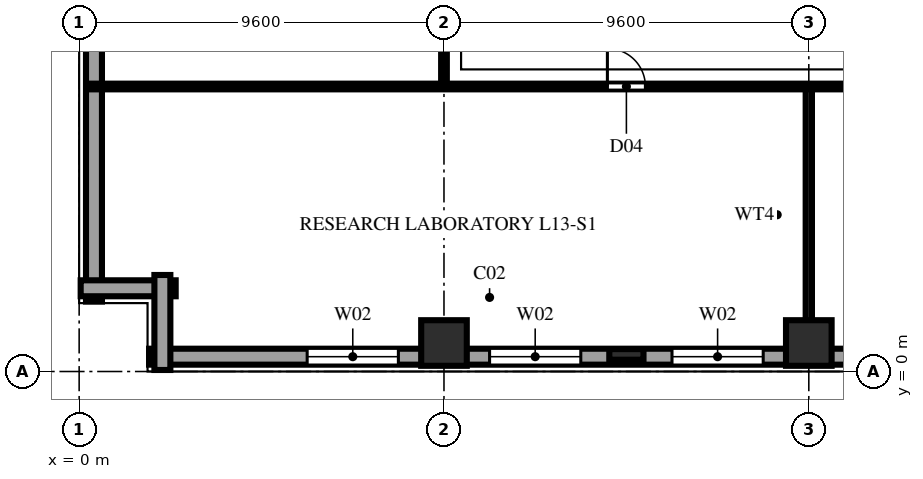
"""IFC4 building model, lengths in metres.
Left out: names, types, materials, properties, quantities, classifications, styles, units other than length and angle.
Written with IfcOpenShell. Run it as: python <this file> out.ifc"""

import sys

from ifc_helpers import new_model, si_unit, direction, frame, frame_2d, origin, origin_2d, place, context, subcontext, project, spatial, rectangle, extrude, element, fill, save


model = new_model("IFC4")
c1 = context("Model", 3, precision=1e-05, world=origin(), true_north=direction((0.0, 1.0)))
c2 = subcontext(c1, "Body", "Model", "MODEL_VIEW")
j1 = project(units=[si_unit("LENGTHUNIT", "METRE"), si_unit("PLANEANGLEUNIT", "RADIAN")], contexts=[c1])
p1 = place(None, origin())
s1 = spatial("IfcSite", under=j1, at=p1, CompositionType="ELEMENT")
p2 = place(p1, origin())
s2 = spatial("IfcBuilding", under=s1, at=p2, CompositionType="ELEMENT")
p3 = place(p2, frame((0.0, 0.0, 54.6)))
s3 = spatial("IfcBuildingStorey", under=s2, at=p3, CompositionType="ELEMENT", Elevation=54.6)
for number, where, z_axis, x_axis in (
    (1, (9.6, 0.75, 0.0), (0.0, 0.0, 1.0), (1.0, 0.0, 0.0)),
    (2, (19.2, 0.75, 0.0), (0.0, 0.0, 1.0), (1.0, 0.0, 0.0)),
):
    element("IfcColumn", number, at=place(p3, frame(where, z_axis=z_axis, x_axis=x_axis)), inside=s3, PredefinedType="COLUMN", context=c2, shape_type="SweptSolid", body=[
        extrude(rectangle(XDim=1.2, YDim=1.2, at=origin_2d()), origin(), (0.0, 0.0, 1.0), 3.8),
    ])
p4 = place(p3, frame((14.4, 0.45, 0.0), z_axis=(0.0, 0.0, 1.0), x_axis=(1.0, 0.0, 0.0)))
e3 = element("IfcColumn", 3, at=p4, inside=s3, PredefinedType="PILASTER", context=c2, shape_type="SweptSolid", body=[
    extrude(rectangle(XDim=0.9, YDim=0.28, at=origin_2d()), origin(), (0.0, 0.0, 1.0), 3.8),
])
p5 = place(p3, frame((1.84, 0.39, 0.0), z_axis=(0.0, 0.0, 1.0), x_axis=(1.0, 0.0, 0.0)))
e4 = element("IfcWall", 4, at=p5, inside=s3, PredefinedType="SOLIDWALL", context=c2, shape_type="SweptSolid", body=[
    extrude(rectangle(XDim=63.52, YDim=0.42, at=frame_2d((31.76, 0.0))), origin(), (0.0, 0.0, 1.0), 3.54),
])
p6 = place(p5, frame((4.16, 0.0, 0.85)))
e5 = element("IfcOpeningElement", 5, at=p6, cuts=e4, PredefinedType="OPENING", context=c2, shape_type="SweptSolid", body=[
    extrude(rectangle(XDim=2.4, YDim=1.85, at=frame_2d((1.2, 0.925))), frame((0.0, 0.222, 0.0), z_axis=(0.0, -1.0, 0.0), x_axis=(1.0, 0.0, 0.0)), (0.0, 0.0, 1.0), 0.444),
])
p7 = place(p5, frame((8.96, 0.0, 0.85)))
e6 = element("IfcOpeningElement", 6, at=p7, cuts=e4, PredefinedType="OPENING", context=c2, shape_type="SweptSolid", body=[
    extrude(rectangle(XDim=2.4, YDim=1.85, at=frame_2d((1.2, 0.925))), frame((0.0, 0.222, 0.0), z_axis=(0.0, -1.0, 0.0), x_axis=(1.0, 0.0, 0.0)), (0.0, 0.0, 1.0), 0.444),
])
p8 = place(p5, frame((13.76, 0.0, 0.85)))
e7 = element("IfcOpeningElement", 7, at=p8, cuts=e4, PredefinedType="OPENING", context=c2, shape_type="SweptSolid", body=[
    extrude(rectangle(XDim=2.4, YDim=1.85, at=frame_2d((1.2, 0.925))), frame((0.0, 0.222, 0.0), z_axis=(0.0, -1.0, 0.0), x_axis=(1.0, 0.0, 0.0)), (0.0, 0.0, 1.0), 0.444),
])
p9 = place(p5, frame((18.56, 0.0, 0.85)))
e8 = element("IfcOpeningElement", 8, at=p9, cuts=e4, PredefinedType="OPENING", context=c2, shape_type="SweptSolid", body=[
    extrude(rectangle(XDim=2.4, YDim=1.85, at=frame_2d((1.2, 0.925))), frame((0.0, 0.222, 0.0), z_axis=(0.0, -1.0, 0.0), x_axis=(1.0, 0.0, 0.0)), (0.0, 0.0, 1.0), 0.444),
])
p10 = place(p5, frame((23.36, 0.0, 0.85)))
e9 = element("IfcOpeningElement", 9, at=p10, cuts=e4, PredefinedType="OPENING", context=c2, shape_type="SweptSolid", body=[
    extrude(rectangle(XDim=2.4, YDim=1.85, at=frame_2d((1.2, 0.925))), frame((0.0, 0.222, 0.0), z_axis=(0.0, -1.0, 0.0), x_axis=(1.0, 0.0, 0.0)), (0.0, 0.0, 1.0), 0.444),
])
p11 = place(p5, frame((28.16, 0.0, 0.85)))
e10 = element("IfcOpeningElement", 10, at=p11, cuts=e4, PredefinedType="OPENING", context=c2, shape_type="SweptSolid", body=[
    extrude(rectangle(XDim=2.4, YDim=1.85, at=frame_2d((1.2, 0.925))), frame((0.0, 0.222, 0.0), z_axis=(0.0, -1.0, 0.0), x_axis=(1.0, 0.0, 0.0)), (0.0, 0.0, 1.0), 0.444),
])
p12 = place(p3, frame((0.39, 65.36, 0.0), z_axis=(0.0, 0.0, 1.0), x_axis=(0.0, -1.0, 0.0)))
e11 = element("IfcWall", 11, at=p12, inside=s3, PredefinedType="SOLIDWALL", context=c2, shape_type="SweptSolid", body=[
    extrude(rectangle(XDim=63.52, YDim=0.42, at=frame_2d((31.76, 0.0))), origin(), (0.0, 0.0, 1.0), 3.54),
])
p13 = place(p12, frame((4.885, 0.0, 0.9)))
e12 = element("IfcOpeningElement", 12, at=p13, cuts=e11, PredefinedType="OPENING", context=c2, shape_type="SweptSolid", body=[
    extrude(rectangle(XDim=0.95, YDim=1.85, at=frame_2d((0.475, 0.925))), frame((0.0, 0.222, 0.0), z_axis=(0.0, -1.0, 0.0), x_axis=(1.0, 0.0, 0.0)), (0.0, 0.0, 1.0), 0.444),
])
p14 = place(p12, frame((9.41, 0.0, 0.9)))
e13 = element("IfcOpeningElement", 13, at=p14, cuts=e11, PredefinedType="OPENING", context=c2, shape_type="SweptSolid", body=[
    extrude(rectangle(XDim=1.5, YDim=1.85, at=frame_2d((0.75, 0.925))), frame((0.0, 0.222, 0.0), z_axis=(0.0, -1.0, 0.0), x_axis=(1.0, 0.0, 0.0)), (0.0, 0.0, 1.0), 0.444),
])
p15 = place(p12, frame((14.485, 0.0, 0.9)))
e14 = element("IfcOpeningElement", 14, at=p15, cuts=e11, PredefinedType="OPENING", context=c2, shape_type="SweptSolid", body=[
    extrude(rectangle(XDim=0.95, YDim=1.85, at=frame_2d((0.475, 0.925))), frame((0.0, 0.222, 0.0), z_axis=(0.0, -1.0, 0.0), x_axis=(1.0, 0.0, 0.0)), (0.0, 0.0, 1.0), 0.444),
])
p16 = place(p12, frame((19.01, 0.0, 0.9)))
e15 = element("IfcOpeningElement", 15, at=p16, cuts=e11, PredefinedType="OPENING", context=c2, shape_type="SweptSolid", body=[
    extrude(rectangle(XDim=1.5, YDim=1.85, at=frame_2d((0.75, 0.925))), frame((0.0, 0.222, 0.0), z_axis=(0.0, -1.0, 0.0), x_axis=(1.0, 0.0, 0.0)), (0.0, 0.0, 1.0), 0.444),
])
p17 = place(p12, frame((24.085, 0.0, 0.9)))
e16 = element("IfcOpeningElement", 16, at=p17, cuts=e11, PredefinedType="OPENING", context=c2, shape_type="SweptSolid", body=[
    extrude(rectangle(XDim=0.95, YDim=1.85, at=frame_2d((0.475, 0.925))), frame((0.0, 0.222, 0.0), z_axis=(0.0, -1.0, 0.0), x_axis=(1.0, 0.0, 0.0)), (0.0, 0.0, 1.0), 0.444),
])
p18 = place(p12, frame((28.61, 0.0, 0.9)))
e17 = element("IfcOpeningElement", 17, at=p18, cuts=e11, PredefinedType="OPENING", context=c2, shape_type="SweptSolid", body=[
    extrude(rectangle(XDim=1.5, YDim=1.85, at=frame_2d((0.75, 0.925))), frame((0.0, 0.222, 0.0), z_axis=(0.0, -1.0, 0.0), x_axis=(1.0, 0.0, 0.0)), (0.0, 0.0, 1.0), 0.444),
])
p19 = place(p12, frame((33.685, 0.0, 0.9)))
e18 = element("IfcOpeningElement", 18, at=p19, cuts=e11, PredefinedType="OPENING", context=c2, shape_type="SweptSolid", body=[
    extrude(rectangle(XDim=0.95, YDim=1.85, at=frame_2d((0.475, 0.925))), frame((0.0, 0.222, 0.0), z_axis=(0.0, -1.0, 0.0), x_axis=(1.0, 0.0, 0.0)), (0.0, 0.0, 1.0), 0.444),
])
p20 = place(p12, frame((38.21, 0.0, 0.9)))
e19 = element("IfcOpeningElement", 19, at=p20, cuts=e11, PredefinedType="OPENING", context=c2, shape_type="SweptSolid", body=[
    extrude(rectangle(XDim=1.5, YDim=1.85, at=frame_2d((0.75, 0.925))), frame((0.0, 0.222, 0.0), z_axis=(0.0, -1.0, 0.0), x_axis=(1.0, 0.0, 0.0)), (0.0, 0.0, 1.0), 0.444),
])
p21 = place(p12, frame((43.285, 0.0, 0.9)))
e20 = element("IfcOpeningElement", 20, at=p21, cuts=e11, PredefinedType="OPENING", context=c2, shape_type="SweptSolid", body=[
    extrude(rectangle(XDim=0.95, YDim=1.85, at=frame_2d((0.475, 0.925))), frame((0.0, 0.222, 0.0), z_axis=(0.0, -1.0, 0.0), x_axis=(1.0, 0.0, 0.0)), (0.0, 0.0, 1.0), 0.444),
])
p22 = place(p12, frame((47.81, 0.0, 0.9)))
e21 = element("IfcOpeningElement", 21, at=p22, cuts=e11, PredefinedType="OPENING", context=c2, shape_type="SweptSolid", body=[
    extrude(rectangle(XDim=1.5, YDim=1.85, at=frame_2d((0.75, 0.925))), frame((0.0, 0.222, 0.0), z_axis=(0.0, -1.0, 0.0), x_axis=(1.0, 0.0, 0.0)), (0.0, 0.0, 1.0), 0.444),
])
p23 = place(p12, frame((52.885, 0.0, 0.9)))
e22 = element("IfcOpeningElement", 22, at=p23, cuts=e11, PredefinedType="OPENING", context=c2, shape_type="SweptSolid", body=[
    extrude(rectangle(XDim=0.95, YDim=1.85, at=frame_2d((0.475, 0.925))), frame((0.0, 0.222, 0.0), z_axis=(0.0, -1.0, 0.0), x_axis=(1.0, 0.0, 0.0)), (0.0, 0.0, 1.0), 0.444),
])
for number, where, z_axis, x_axis in (
    (23, (0.04, 2.19, 0.0), (0.0, 0.0, 1.0), (1.0, 0.0, 0.0)),
    (24, (2.19, 2.54, 0.0), (0.0, 0.0, 1.0), (0.0, -1.0, 0.0)),
):
    element("IfcWall", number, at=place(p3, frame(where, z_axis=z_axis, x_axis=x_axis)), inside=s3, PredefinedType="SOLIDWALL", context=c2, shape_type="SweptSolid", body=[
        extrude(rectangle(XDim=2.5, YDim=0.42, at=frame_2d((1.25, 0.0))), origin(), (0.0, 0.0, 1.0), 3.54),
    ])
p24 = place(p3, frame((9.6, 7.5, 0.0), z_axis=(0.0, 0.0, 1.0), x_axis=(0.0, 1.0, 0.0)))
e25 = element("IfcWall", 25, at=p24, inside=s3, PredefinedType="PARTITIONING", context=c2, shape_type="SweptSolid", body=[
    extrude(rectangle(XDim=2.1, YDim=0.15, at=frame_2d((1.05, 0.0))), origin(), (0.0, 0.0, 1.0), 3.232),
])
p25 = place(p3, frame((19.2, 0.22, 0.0), z_axis=(0.0, 0.0, 1.0), x_axis=(0.0, 1.0, 0.0)))
e26 = element("IfcWall", 26, at=p25, inside=s3, PredefinedType="PLUMBINGWALL", context=c2, shape_type="SweptSolid", body=[
    extrude(rectangle(XDim=0.53, YDim=0.165, at=frame_2d((0.265, 0.0))), origin(), (0.0, 0.0, 1.0), 3.54),
])
p26 = place(p3, frame((19.2, 0.75, 0.0), z_axis=(0.0, 0.0, 1.0), x_axis=(0.0, 1.0, 0.0)))
e27 = element("IfcWall", 27, at=p26, inside=s3, PredefinedType="PLUMBINGWALL", context=c2, shape_type="SweptSolid", body=[
    extrude(rectangle(XDim=6.75, YDim=0.165, at=frame_2d((3.375, 0.0))), origin(), (0.0, 0.0, 1.0), 3.232),
])
p27 = place(p3, frame((0.22, 7.5, 0.0), z_axis=(0.0, 0.0, 1.0), x_axis=(1.0, 0.0, 0.0)))
e28 = element("IfcWall", 28, at=p27, inside=s3, PredefinedType="PARTITIONING", context=c2, shape_type="SweptSolid", body=[
    extrude(rectangle(XDim=57.38, YDim=0.15, at=frame_2d((28.69, 0.0))), origin(), (0.0, 0.0, 1.0), 3.54),
])
p28 = place(p27, frame((13.68, 0.0, 0.0)))
e29 = element("IfcOpeningElement", 29, at=p28, cuts=e28, PredefinedType="OPENING", context=c2, shape_type="SweptSolid", body=[
    extrude(rectangle(XDim=1.0, YDim=2.2, at=frame_2d((0.5, 1.1))), frame((0.0, 0.087, 0.0), z_axis=(0.0, -1.0, 0.0), x_axis=(1.0, 0.0, 0.0)), (0.0, 0.0, 1.0), 0.174),
])
p29 = place(p27, frame((23.28, 0.0, 0.0)))
e30 = element("IfcOpeningElement", 30, at=p29, cuts=e28, PredefinedType="OPENING", context=c2, shape_type="SweptSolid", body=[
    extrude(rectangle(XDim=1.0, YDim=2.2, at=frame_2d((0.5, 1.1))), frame((0.0, 0.087, 0.0), z_axis=(0.0, -1.0, 0.0), x_axis=(1.0, 0.0, 0.0)), (0.0, 0.0, 1.0), 0.174),
])
p30 = place(p27, frame((51.23, 0.0, 0.0)))
e31 = element("IfcOpeningElement", 31, at=p30, cuts=e28, PredefinedType="OPENING", context=c2, shape_type="SweptSolid", body=[
    extrude(rectangle(XDim=1.2, YDim=2.2, at=frame_2d((0.6, 1.1))), frame((0.0, 0.087, 0.0), z_axis=(0.0, -1.0, 0.0), x_axis=(1.0, 0.0, 0.0)), (0.0, 0.0, 1.0), 0.174),
])
p31 = place(p6, origin())
e32 = element("IfcWindow", 32, at=p31, inside=s3, PartitioningType="TRIPLE_PANEL_VERTICAL", PredefinedType="WINDOW", context=c2, shape_type="SweptSolid", body=[
    extrude(rectangle(XDim=2.4, YDim=1.85, at=frame_2d((1.2, 0.925))), frame((0.0, 0.11, 0.0), z_axis=(0.0, -1.0, 0.0), x_axis=(1.0, 0.0, 0.0)), (0.0, 0.0, 1.0), 0.06),
])
fill(e5, e32)
p32 = place(p7, origin())
e33 = element("IfcWindow", 33, at=p32, inside=s3, PartitioningType="TRIPLE_PANEL_VERTICAL", PredefinedType="WINDOW", context=c2, shape_type="SweptSolid", body=[
    extrude(rectangle(XDim=2.4, YDim=1.85, at=frame_2d((1.2, 0.925))), frame((0.0, 0.11, 0.0), z_axis=(0.0, -1.0, 0.0), x_axis=(1.0, 0.0, 0.0)), (0.0, 0.0, 1.0), 0.06),
])
fill(e6, e33)
p33 = place(p8, origin())
e34 = element("IfcWindow", 34, at=p33, inside=s3, PartitioningType="TRIPLE_PANEL_VERTICAL", PredefinedType="WINDOW", context=c2, shape_type="SweptSolid", body=[
    extrude(rectangle(XDim=2.4, YDim=1.85, at=frame_2d((1.2, 0.925))), frame((0.0, 0.11, 0.0), z_axis=(0.0, -1.0, 0.0), x_axis=(1.0, 0.0, 0.0)), (0.0, 0.0, 1.0), 0.06),
])
fill(e7, e34)
p34 = place(p28, origin())
e35 = element("IfcDoor", 35, at=p34, inside=s3, OperationType="SINGLE_SWING_LEFT", PredefinedType="DOOR", context=c2, shape_type="SweptSolid", body=[
    extrude(rectangle(XDim=1.0, YDim=2.2, at=frame_2d((0.5, 1.1))), frame((0.0, 0.025, 0.0), z_axis=(0.0, -1.0, 0.0), x_axis=(1.0, 0.0, 0.0)), (0.0, 0.0, 1.0), 0.05),
])
fill(e29, e35)
save(model, sys.argv[1])
